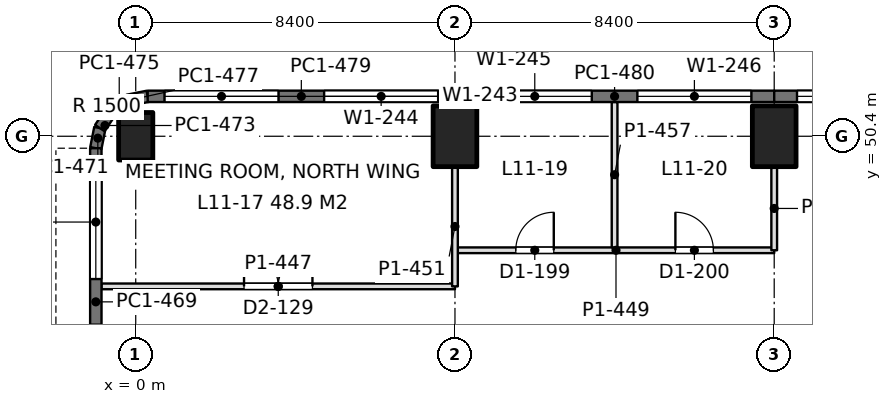
"""IFC4 building model, lengths in metres.
Left out: names, types, materials, properties, quantities, classifications, styles, units other than length and angle.
Written with IfcOpenShell. Run it as: python <this file> out.ifc"""

import sys

from ifc_helpers import new_model, si_unit, direction, frame, frame_2d, origin, origin_2d, place, context, subcontext, project, spatial, rectangle, extrude, element, fill, save


model = new_model("IFC4")
c1 = context("Model", 3, precision=1e-05, world=origin(), true_north=direction((0.0, 1.0)))
c2 = subcontext(c1, "Body", "Model", "MODEL_VIEW")
j1 = project(units=[si_unit("LENGTHUNIT", "METRE"), si_unit("PLANEANGLEUNIT", "RADIAN")], contexts=[c1])
p1 = place(None, origin())
s1 = spatial("IfcSite", under=j1, at=p1, CompositionType="ELEMENT")
p2 = place(p1, origin())
s2 = spatial("IfcBuilding", under=s1, at=p2, CompositionType="ELEMENT")
p3 = place(p2, frame((0.0, 0.0, 50.4)))
s3 = spatial("IfcBuildingStorey", under=s2, at=p3, CompositionType="ELEMENT", Elevation=50.4)
p4 = place(p3, frame((0.0, 50.4, 0.0), z_axis=(0.0, 0.0, 1.0), x_axis=(1.0, 0.0, 0.0)))
e1 = element("IfcColumn", 1, at=p4, inside=s3, PredefinedType="COLUMN", context=c2, shape_type="SweptSolid", body=[
    extrude(rectangle(XDim=0.9, YDim=1.25, at=origin_2d()), origin(), (0.0, 0.0, 1.0), 4.5),
])
for number, where, z_axis, x_axis in (
    (2, (8.4, 50.4, 0.0), (0.0, 0.0, 1.0), (1.0, 0.0, 0.0)),
    (3, (16.8, 50.4, 0.0), (0.0, 0.0, 1.0), (1.0, 0.0, 0.0)),
):
    element("IfcColumn", number, at=place(p3, frame(where, z_axis=z_axis, x_axis=x_axis)), inside=s3, PredefinedType="COLUMN", context=c2, shape_type="SweptSolid", body=[
        extrude(rectangle(XDim=1.15, YDim=1.6, at=origin_2d()), origin(), (0.0, 0.0, 1.0), 4.5),
    ])
p5 = place(p3, frame((-1.05, 42.0, 0.0), z_axis=(0.0, 0.0, 1.0), x_axis=(0.0, 1.0, 0.0)))
e4 = element("IfcWall", 4, at=p5, inside=s3, PredefinedType="SOLIDWALL", context=c2, shape_type="SweptSolid", body=[
    extrude(rectangle(XDim=8.085, YDim=0.3, at=frame_2d((4.042, 0.0))), origin(), (0.0, 0.0, 1.0), 4.34),
])
p6 = place(p5, frame((0.443, 0.0, 0.9)))
e5 = element("IfcOpeningElement", 5, at=p6, cuts=e4, PredefinedType="OPENING", context=c2, shape_type="SweptSolid", body=[
    extrude(rectangle(XDim=3.0, YDim=1.9, at=frame_2d((1.5, 0.95))), frame((0.0, 0.16, 0.0), z_axis=(0.0, -1.0, 0.0), x_axis=(1.0, 0.0, 0.0)), (0.0, 0.0, 1.0), 0.32),
])
p7 = place(p5, frame((4.643, 0.0, 0.9)))
e6 = element("IfcOpeningElement", 6, at=p7, cuts=e4, PredefinedType="OPENING", context=c2, shape_type="SweptSolid", body=[
    extrude(rectangle(XDim=3.0, YDim=1.9, at=frame_2d((1.5, 0.95))), frame((0.0, 0.16, 0.0), z_axis=(0.0, -1.0, 0.0), x_axis=(1.0, 0.0, 0.0)), (0.0, 0.0, 1.0), 0.32),
])
p8 = place(p3, frame((-1.05, 50.085, 0.0), z_axis=(0.0, 0.0, 1.0), x_axis=(0.195073962632, 0.980788534345, 0.0)))
e7 = element("IfcWall", 7, at=p8, inside=s3, PredefinedType="SOLIDWALL", context=c2, shape_type="SweptSolid", body=[
    extrude(rectangle(XDim=0.541, YDim=0.3, at=frame_2d((0.271, 0.0))), origin(), (0.0, 0.0, 1.0), 4.34),
])
for number, where, z_axis, x_axis in (
    (8, (-0.945, 50.615, 0.0), (0.0, 0.0, 1.0), (0.556, 0.831, 0.0)),
    (9, (-0.653, 51.052, 0.0), (0.0, 0.0, 1.0), (0.831, 0.556, 0.0)),
):
    element("IfcWall", number, at=place(p3, frame(where, z_axis=z_axis, x_axis=x_axis)), inside=s3, PredefinedType="SOLIDWALL", context=c2, shape_type="SweptSolid", body=[
        extrude(rectangle(XDim=0.526, YDim=0.3, at=frame_2d((0.263, 0.0))), origin(), (0.0, 0.0, 1.0), 4.34),
    ])
p9 = place(p3, frame((-0.216, 51.344, 0.0), z_axis=(0.0, 0.0, 1.0), x_axis=(0.980788534345, 0.195073962632, 0.0)))
e10 = element("IfcWall", 10, at=p9, inside=s3, PredefinedType="SOLIDWALL", context=c2, shape_type="SweptSolid", body=[
    extrude(rectangle(XDim=0.541, YDim=0.3, at=frame_2d((0.271, 0.0))), origin(), (0.0, 0.0, 1.0), 4.34),
])
p10 = place(p3, frame((0.315, 51.45, 0.0), z_axis=(0.0, 0.0, 1.0), x_axis=(1.0, 0.0, 0.0)))
e11 = element("IfcWall", 11, at=p10, inside=s3, PredefinedType="SOLIDWALL", context=c2, shape_type="SweptSolid", body=[
    extrude(rectangle(XDim=8.085, YDim=0.3, at=frame_2d((4.042, 0.0))), origin(), (0.0, 0.0, 1.0), 4.34),
])
p11 = place(p10, frame((0.443, 0.0, 0.9)))
e12 = element("IfcOpeningElement", 12, at=p11, cuts=e11, PredefinedType="OPENING", context=c2, shape_type="SweptSolid", body=[
    extrude(rectangle(XDim=3.0, YDim=1.9, at=frame_2d((1.5, 0.95))), frame((0.0, 0.16, 0.0), z_axis=(0.0, -1.0, 0.0), x_axis=(1.0, 0.0, 0.0)), (0.0, 0.0, 1.0), 0.32),
])
p12 = place(p10, frame((4.643, 0.0, 0.9)))
e13 = element("IfcOpeningElement", 13, at=p12, cuts=e11, PredefinedType="OPENING", context=c2, shape_type="SweptSolid", body=[
    extrude(rectangle(XDim=3.0, YDim=1.9, at=frame_2d((1.5, 0.95))), frame((0.0, 0.16, 0.0), z_axis=(0.0, -1.0, 0.0), x_axis=(1.0, 0.0, 0.0)), (0.0, 0.0, 1.0), 0.32),
])
p13 = place(p3, frame((8.4, 51.45, 0.0), z_axis=(0.0, 0.0, 1.0), x_axis=(1.0, 0.0, 0.0)))
e14 = element("IfcWall", 14, at=p13, inside=s3, PredefinedType="SOLIDWALL", context=c2, shape_type="SweptSolid", body=[
    extrude(rectangle(XDim=8.4, YDim=0.3, at=frame_2d((4.2, 0.0))), origin(), (0.0, 0.0, 1.0), 4.34),
])
p14 = place(p13, frame((0.6, 0.0, 0.9)))
e15 = element("IfcOpeningElement", 15, at=p14, cuts=e14, PredefinedType="OPENING", context=c2, shape_type="SweptSolid", body=[
    extrude(rectangle(XDim=3.0, YDim=1.9, at=frame_2d((1.5, 0.95))), frame((0.0, 0.16, 0.0), z_axis=(0.0, -1.0, 0.0), x_axis=(1.0, 0.0, 0.0)), (0.0, 0.0, 1.0), 0.32),
])
p15 = place(p13, frame((4.8, 0.0, 0.9)))
e16 = element("IfcOpeningElement", 16, at=p15, cuts=e14, PredefinedType="OPENING", context=c2, shape_type="SweptSolid", body=[
    extrude(rectangle(XDim=3.0, YDim=1.9, at=frame_2d((1.5, 0.95))), frame((0.0, 0.16, 0.0), z_axis=(0.0, -1.0, 0.0), x_axis=(1.0, 0.0, 0.0)), (0.0, 0.0, 1.0), 0.32),
])
p16 = place(p3, frame((16.8, 51.45, 0.0), z_axis=(0.0, 0.0, 1.0), x_axis=(1.0, 0.0, 0.0)))
e17 = element("IfcWall", 17, at=p16, inside=s3, PredefinedType="SOLIDWALL", context=c2, shape_type="SweptSolid", body=[
    extrude(rectangle(XDim=8.4, YDim=0.3, at=frame_2d((4.2, 0.0))), origin(), (0.0, 0.0, 1.0), 4.34),
])
p17 = place(p16, frame((0.6, 0.0, 0.9)))
e18 = element("IfcOpeningElement", 18, at=p17, cuts=e17, PredefinedType="OPENING", context=c2, shape_type="SweptSolid", body=[
    extrude(rectangle(XDim=3.0, YDim=1.9, at=frame_2d((1.5, 0.95))), frame((0.0, 0.16, 0.0), z_axis=(0.0, -1.0, 0.0), x_axis=(1.0, 0.0, 0.0)), (0.0, 0.0, 1.0), 0.32),
])
p18 = place(p16, frame((4.8, 0.0, 0.9)))
e19 = element("IfcOpeningElement", 19, at=p18, cuts=e17, PredefinedType="OPENING", context=c2, shape_type="SweptSolid", body=[
    extrude(rectangle(XDim=3.0, YDim=1.9, at=frame_2d((1.5, 0.95))), frame((0.0, 0.16, 0.0), z_axis=(0.0, -1.0, 0.0), x_axis=(1.0, 0.0, 0.0)), (0.0, 0.0, 1.0), 0.32),
])
p19 = place(p3, frame((-0.902, 46.45, 0.0), z_axis=(0.0, 0.0, 1.0), x_axis=(1.0, 0.0, 0.0)))
e20 = element("IfcWall", 20, at=p19, inside=s3, PredefinedType="PARTITIONING", context=c2, shape_type="SweptSolid", body=[
    extrude(rectangle(XDim=9.302, YDim=0.15, at=frame_2d((4.651, 0.0))), origin(), (0.0, 0.0, 1.0), 3.74),
])
p20 = place(p19, frame((3.752, 0.0, 0.0)))
e21 = element("IfcOpeningElement", 21, at=p20, cuts=e20, PredefinedType="OPENING", context=c2, shape_type="SweptSolid", body=[
    extrude(rectangle(XDim=1.8, YDim=2.2, at=frame_2d((0.9, 1.1))), frame((0.0, 0.085, 0.0), z_axis=(0.0, -1.0, 0.0), x_axis=(1.0, 0.0, 0.0)), (0.0, 0.0, 1.0), 0.17),
])
p21 = place(p3, frame((8.474, 47.4, 0.0), z_axis=(0.0, 0.0, 1.0), x_axis=(1.0, 0.0, 0.0)))
e22 = element("IfcWall", 22, at=p21, inside=s3, PredefinedType="PARTITIONING", context=c2, shape_type="SweptSolid", body=[
    extrude(rectangle(XDim=8.326, YDim=0.15, at=frame_2d((4.163, 0.0))), origin(), (0.0, 0.0, 1.0), 3.74),
])
p22 = place(p21, frame((1.526, 0.0, 0.0)))
e23 = element("IfcOpeningElement", 23, at=p22, cuts=e22, PredefinedType="OPENING", context=c2, shape_type="SweptSolid", body=[
    extrude(rectangle(XDim=1.0, YDim=2.2, at=frame_2d((0.5, 1.1))), frame((0.0, 0.085, 0.0), z_axis=(0.0, -1.0, 0.0), x_axis=(1.0, 0.0, 0.0)), (0.0, 0.0, 1.0), 0.17),
])
p23 = place(p21, frame((5.726, 0.0, 0.0)))
e24 = element("IfcOpeningElement", 24, at=p23, cuts=e22, PredefinedType="OPENING", context=c2, shape_type="SweptSolid", body=[
    extrude(rectangle(XDim=1.0, YDim=2.2, at=frame_2d((0.5, 1.1))), frame((0.0, 0.085, 0.0), z_axis=(0.0, -1.0, 0.0), x_axis=(1.0, 0.0, 0.0)), (0.0, 0.0, 1.0), 0.17),
])
p24 = place(p3, frame((8.4, 46.45, 0.0), z_axis=(0.0, 0.0, 1.0), x_axis=(0.0, 1.0, 0.0)))
e25 = element("IfcWall", 25, at=p24, inside=s3, PredefinedType="PARTITIONING", context=c2, shape_type="SweptSolid", body=[
    extrude(rectangle(XDim=3.151, YDim=0.15, at=frame_2d((1.576, 0.0))), origin(), (0.0, 0.0, 1.0), 3.74),
])
p25 = place(p3, frame((12.6, 47.474, 0.0), z_axis=(0.0, 0.0, 1.0), x_axis=(0.0, 1.0, 0.0)))
e26 = element("IfcWall", 26, at=p25, inside=s3, PredefinedType="PARTITIONING", context=c2, shape_type="SweptSolid", body=[
    extrude(rectangle(XDim=3.828, YDim=0.15, at=frame_2d((1.914, 0.0))), origin(), (0.0, 0.0, 1.0), 3.84),
])
p26 = place(p3, frame((16.8, 47.4, 0.0), z_axis=(0.0, 0.0, 1.0), x_axis=(0.0, 1.0, 0.0)))
e27 = element("IfcWall", 27, at=p26, inside=s3, PredefinedType="PARTITIONING", context=c2, shape_type="SweptSolid", body=[
    extrude(rectangle(XDim=2.201, YDim=0.15, at=frame_2d((1.101, 0.0))), origin(), (0.0, 0.0, 1.0), 3.74),
])
p27 = place(p7, origin())
e28 = element("IfcWindow", 28, at=p27, inside=s3, PartitioningType="SINGLE_PANEL", PredefinedType="WINDOW", context=c2, shape_type="SweptSolid", body=[
    extrude(rectangle(XDim=3.0, YDim=1.9, at=frame_2d((1.5, 0.95))), frame((0.0, 0.03, 0.0), z_axis=(0.0, -1.0, 0.0), x_axis=(1.0, 0.0, 0.0)), (0.0, 0.0, 1.0), 0.06),
])
fill(e6, e28)
p28 = place(p11, origin())
e29 = element("IfcWindow", 29, at=p28, inside=s3, PartitioningType="SINGLE_PANEL", PredefinedType="WINDOW", context=c2, shape_type="SweptSolid", body=[
    extrude(rectangle(XDim=3.0, YDim=1.9, at=frame_2d((1.5, 0.95))), frame((0.0, 0.03, 0.0), z_axis=(0.0, -1.0, 0.0), x_axis=(1.0, 0.0, 0.0)), (0.0, 0.0, 1.0), 0.06),
])
fill(e12, e29)
p29 = place(p12, origin())
e30 = element("IfcWindow", 30, at=p29, inside=s3, PartitioningType="SINGLE_PANEL", PredefinedType="WINDOW", context=c2, shape_type="SweptSolid", body=[
    extrude(rectangle(XDim=3.0, YDim=1.9, at=frame_2d((1.5, 0.95))), frame((0.0, 0.03, 0.0), z_axis=(0.0, -1.0, 0.0), x_axis=(1.0, 0.0, 0.0)), (0.0, 0.0, 1.0), 0.06),
])
fill(e13, e30)
p30 = place(p14, origin())
e31 = element("IfcWindow", 31, at=p30, inside=s3, PartitioningType="SINGLE_PANEL", PredefinedType="WINDOW", context=c2, shape_type="SweptSolid", body=[
    extrude(rectangle(XDim=3.0, YDim=1.9, at=frame_2d((1.5, 0.95))), frame((0.0, 0.03, 0.0), z_axis=(0.0, -1.0, 0.0), x_axis=(1.0, 0.0, 0.0)), (0.0, 0.0, 1.0), 0.06),
])
fill(e15, e31)
p31 = place(p15, origin())
e32 = element("IfcWindow", 32, at=p31, inside=s3, PartitioningType="SINGLE_PANEL", PredefinedType="WINDOW", context=c2, shape_type="SweptSolid", body=[
    extrude(rectangle(XDim=3.0, YDim=1.9, at=frame_2d((1.5, 0.95))), frame((0.0, 0.03, 0.0), z_axis=(0.0, -1.0, 0.0), x_axis=(1.0, 0.0, 0.0)), (0.0, 0.0, 1.0), 0.06),
])
fill(e16, e32)
p32 = place(p17, origin())
e33 = element("IfcWindow", 33, at=p32, inside=s3, PartitioningType="SINGLE_PANEL", PredefinedType="WINDOW", context=c2, shape_type="SweptSolid", body=[
    extrude(rectangle(XDim=3.0, YDim=1.9, at=frame_2d((1.5, 0.95))), frame((0.0, 0.03, 0.0), z_axis=(0.0, -1.0, 0.0), x_axis=(1.0, 0.0, 0.0)), (0.0, 0.0, 1.0), 0.06),
])
fill(e18, e33)
p33 = place(p20, origin())
e34 = element("IfcDoor", 34, at=p33, inside=s3, OperationType="DOUBLE_DOOR_SINGLE_SWING", PredefinedType="DOOR", context=c2, shape_type="SweptSolid", body=[
    extrude(rectangle(XDim=1.8, YDim=2.2, at=frame_2d((0.9, 1.1))), frame((0.0, 0.025, 0.0), z_axis=(0.0, -1.0, 0.0), x_axis=(1.0, 0.0, 0.0)), (0.0, 0.0, 1.0), 0.05),
])
fill(e21, e34)
p34 = place(p22, origin())
e35 = element("IfcDoor", 35, at=p34, inside=s3, OperationType="SINGLE_SWING_RIGHT", PredefinedType="DOOR", context=c2, shape_type="SweptSolid", body=[
    extrude(rectangle(XDim=1.0, YDim=2.2, at=frame_2d((0.5, 1.1))), frame((0.0, 0.025, 0.0), z_axis=(0.0, -1.0, 0.0), x_axis=(1.0, 0.0, 0.0)), (0.0, 0.0, 1.0), 0.05),
])
fill(e23, e35)
p35 = place(p23, origin())
e36 = element("IfcDoor", 36, at=p35, inside=s3, OperationType="SINGLE_SWING_LEFT", PredefinedType="DOOR", context=c2, shape_type="SweptSolid", body=[
    extrude(rectangle(XDim=1.0, YDim=2.2, at=frame_2d((0.5, 1.1))), frame((0.0, 0.025, 0.0), z_axis=(0.0, -1.0, 0.0), x_axis=(1.0, 0.0, 0.0)), (0.0, 0.0, 1.0), 0.05),
])
fill(e24, e36)
save(model, sys.argv[1])
